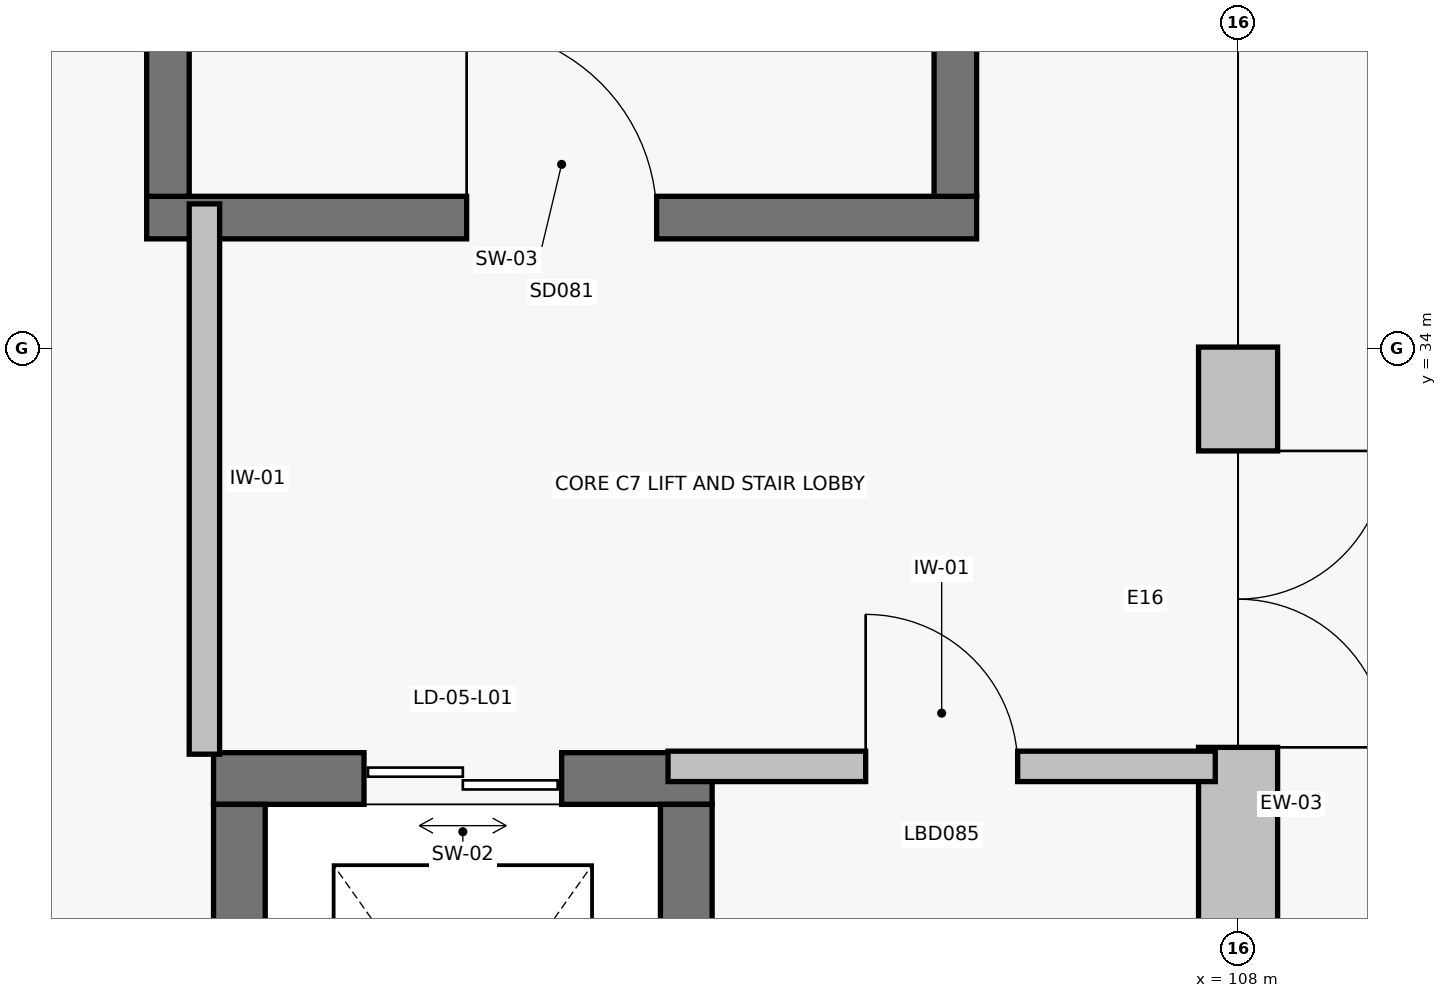
"""IFC4 building model, lengths in metres.
Left out: names, types, materials, properties, quantities, classifications, styles, units other than length and angle.
Written with IfcOpenShell. Run it as: python <this file> out.ifc"""

import sys

from ifc_helpers import new_model, si_unit, direction, frame, frame_2d, origin, origin_2d, place, context, subcontext, project, spatial, rectangle, hollow_rectangle, extrude, element, fill, save


model = new_model("IFC4")
c1 = context("Model", 3, precision=1e-05, world=origin(), true_north=direction((0.0, 1.0)))
c2 = subcontext(c1, "Body", "Model", "MODEL_VIEW")
j1 = project(units=[si_unit("LENGTHUNIT", "METRE"), si_unit("PLANEANGLEUNIT", "RADIAN")], contexts=[c1])
p1 = place(None, origin())
s1 = spatial("IfcSite", under=j1, at=p1, CompositionType="ELEMENT")
p2 = place(p1, origin())
s2 = spatial("IfcBuilding", under=s1, at=p2, CompositionType="ELEMENT")
p3 = place(p2, origin())
s3 = spatial("IfcBuildingStorey", under=s2, at=p3, CompositionType="ELEMENT", Elevation=0.0)
p4 = place(p3, frame((108.0, 34.0, 0.0), z_axis=(0.0, 0.0, 1.0), x_axis=(1.0, 0.0, 0.0)))
e1 = element("IfcColumn", 1, at=p4, inside=s3, PredefinedType="COLUMN", context=c2, shape_type="SweptSolid", body=[
    extrude(hollow_rectangle(XDim=0.305, YDim=0.305, WallThickness=0.013, InnerFilletRadius=0.013, OuterFilletRadius=0.025, at=origin_2d()), origin(), (0.0, 0.0, 1.0), 6.6),
])
p5 = place(p3, frame((108.0, 34.008, 0.0), z_axis=(0.0, 0.0, 1.0), x_axis=(0.0, -1.0, 0.0)))
e2 = element("IfcWall", 2, at=p5, inside=s3, PredefinedType="SOLIDWALL", context=c2, shape_type="SweptSolid", body=[
    extrude(rectangle(XDim=6.016, YDim=0.52, at=frame_2d((3.008, 0.0))), origin(), (0.0, 0.0, 1.0), 5.837),
])
p6 = place(p5, frame((0.683, 0.0, 0.0)))
e3 = element("IfcOpeningElement", 3, at=p6, cuts=e2, PredefinedType="OPENING", context=c2, shape_type="SweptSolid", body=[
    extrude(rectangle(XDim=1.95, YDim=2.4, at=frame_2d((0.975, 1.2))), frame((0.0, 0.275, 0.0), z_axis=(0.0, -1.0, 0.0), x_axis=(1.0, 0.0, 0.0)), (0.0, 0.0, 1.0), 0.55),
])
p7 = place(p3, frame((100.82, 34.86, 0.0), z_axis=(0.0, 0.0, 1.0), x_axis=(1.0, 0.0, 0.0)))
e4 = element("IfcWall", 4, at=p7, inside=s3, PredefinedType="SHEAR", context=c2, shape_type="SweptSolid", body=[
    extrude(rectangle(XDim=5.46, YDim=0.28, at=frame_2d((2.73, 0.0))), origin(), (0.0, 0.0, 1.0), 6.32),
])
p8 = place(p7, frame((2.105, 0.0, 0.0)))
e5 = element("IfcOpeningElement", 5, at=p8, cuts=e4, PredefinedType="OPENING", context=c2, shape_type="SweptSolid", body=[
    extrude(rectangle(XDim=1.25, YDim=2.2, at=frame_2d((0.625, 1.1))), frame((0.0, 0.155, 0.0), z_axis=(0.0, -1.0, 0.0), x_axis=(1.0, 0.0, 0.0)), (0.0, 0.0, 1.0), 0.31),
])
for number, where, z_axis, x_axis in (
    (6, (100.96, 45.0, 0.0), (0.0, 0.0, 1.0), (0.0, -1.0, 0.0)),
    (7, (106.14, 35.0, 0.0), (0.0, 0.0, 1.0), (0.0, 1.0, 0.0)),
):
    element("IfcWall", number, at=place(p3, frame(where, z_axis=z_axis, x_axis=x_axis)), inside=s3, PredefinedType="SHEAR", context=c2, shape_type="SweptSolid", body=[
        extrude(rectangle(XDim=10.0, YDim=0.28, at=frame_2d((5.0, 0.0))), origin(), (0.0, 0.0, 1.0), 6.32),
    ])
p9 = place(p3, frame((104.54, 31.17, 0.0), z_axis=(0.0, 0.0, 1.0), x_axis=(-1.0, 0.0, 0.0)))
e8 = element("IfcWall", 8, at=p9, inside=s3, PredefinedType="SHEAR", context=c2, shape_type="SweptSolid", body=[
    extrude(rectangle(XDim=3.28, YDim=0.34, at=frame_2d((1.64, 0.0))), origin(), (0.0, 0.0, 1.0), 6.32),
])
p10 = place(p9, frame((0.99, 0.0, 0.0)))
e9 = element("IfcOpeningElement", 9, at=p10, cuts=e8, PredefinedType="OPENING", context=c2, shape_type="SweptSolid", body=[
    extrude(rectangle(XDim=1.3, YDim=2.25, at=frame_2d((0.65, 1.125))), frame((0.0, 0.185, 0.0), z_axis=(0.0, -1.0, 0.0), x_axis=(1.0, 0.0, 0.0)), (0.0, 0.0, 1.0), 0.37),
])
for number, where, z_axis, x_axis in (
    (10, (101.43, 31.0, 0.0), (0.0, 0.0, 1.0), (0.0, -1.0, 0.0)),
    (11, (104.37, 27.8, 0.0), (0.0, 0.0, 1.0), (0.0, 1.0, 0.0)),
):
    element("IfcWall", number, at=place(p3, frame(where, z_axis=z_axis, x_axis=x_axis)), inside=s3, PredefinedType="SHEAR", context=c2, shape_type="SweptSolid", body=[
        extrude(rectangle(XDim=3.2, YDim=0.34, at=frame_2d((1.6, 0.0))), origin(), (0.0, 0.0, 1.0), 6.32),
    ])
p11 = place(p3, frame((104.25, 31.25, 0.0), z_axis=(0.0, 0.0, 1.0), x_axis=(1.0, 0.0, 0.0)))
e12 = element("IfcWall", 12, at=p11, inside=s3, PredefinedType="PARTITIONING", context=c2, shape_type="SweptSolid", body=[
    extrude(rectangle(XDim=3.6, YDim=0.2, at=frame_2d((1.8, 0.0))), origin(), (0.0, 0.0, 1.0), 5.946),
])
p12 = place(p11, frame((1.3, 0.0, 0.0)))
e13 = element("IfcOpeningElement", 13, at=p12, cuts=e12, PredefinedType="OPENING", context=c2, shape_type="SweptSolid", body=[
    extrude(rectangle(XDim=1.0, YDim=2.15, at=frame_2d((0.5, 1.075))), frame((0.0, 0.115, 0.0), z_axis=(0.0, -1.0, 0.0), x_axis=(1.0, 0.0, 0.0)), (0.0, 0.0, 1.0), 0.23),
])
p13 = place(p3, frame((101.2, 34.95, 0.0), z_axis=(0.0, 0.0, 1.0), x_axis=(0.0, -1.0, 0.0)))
e14 = element("IfcWall", 14, at=p13, inside=s3, PredefinedType="PARTITIONING", context=c2, shape_type="SweptSolid", body=[
    extrude(rectangle(XDim=3.62, YDim=0.2, at=frame_2d((1.81, 0.0))), origin(), (0.0, 0.0, 1.0), 6.32),
])
p14 = place(p6, origin())
e15 = element("IfcDoor", 15, at=p14, inside=s3, OperationType="DOUBLE_DOOR_SINGLE_SWING", PredefinedType="DOOR", context=c2, shape_type="SweptSolid", body=[
    extrude(rectangle(XDim=1.95, YDim=2.4, at=frame_2d((0.975, 1.2))), frame((0.0, 0.025, 0.0), z_axis=(0.0, -1.0, 0.0), x_axis=(1.0, 0.0, 0.0)), (0.0, 0.0, 1.0), 0.05),
])
fill(e3, e15)
p15 = place(p8, origin())
e16 = element("IfcDoor", 16, at=p15, inside=s3, OperationType="SINGLE_SWING_LEFT", PredefinedType="DOOR", context=c2, shape_type="SweptSolid", body=[
    extrude(rectangle(XDim=1.25, YDim=2.2, at=frame_2d((0.625, 1.1))), frame((0.0, 0.025, 0.0), z_axis=(0.0, -1.0, 0.0), x_axis=(1.0, 0.0, 0.0)), (0.0, 0.0, 1.0), 0.05),
])
fill(e5, e16)
p16 = place(p10, origin())
e17 = element("IfcDoor", 17, at=p16, inside=s3, OperationType="DOUBLE_DOOR_SLIDING", PredefinedType="DOOR", context=c2, shape_type="SweptSolid", body=[
    extrude(rectangle(XDim=1.3, YDim=2.25, at=frame_2d((0.65, 1.125))), frame((0.0, 0.025, 0.0), z_axis=(0.0, -1.0, 0.0), x_axis=(1.0, 0.0, 0.0)), (0.0, 0.0, 1.0), 0.05),
])
fill(e9, e17)
p17 = place(p12, origin())
e18 = element("IfcDoor", 18, at=p17, inside=s3, OperationType="SINGLE_SWING_LEFT", PredefinedType="DOOR", context=c2, shape_type="SweptSolid", body=[
    extrude(rectangle(XDim=1.0, YDim=2.15, at=frame_2d((0.5, 1.075))), frame((0.0, 0.025, 0.0), z_axis=(0.0, -1.0, 0.0), x_axis=(1.0, 0.0, 0.0)), (0.0, 0.0, 1.0), 0.05),
])
fill(e13, e18)
save(model, sys.argv[1])
